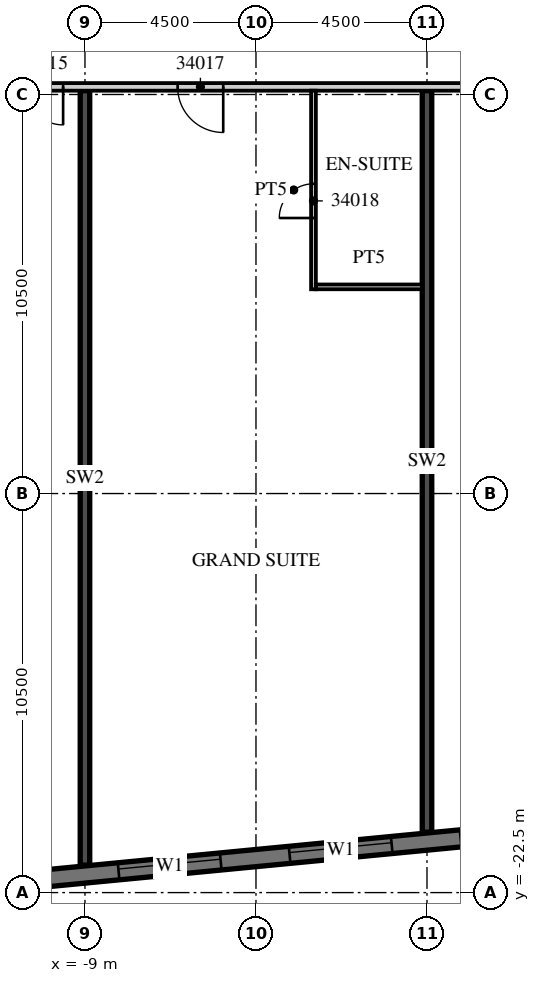
"""IFC4 building model, lengths in metres.
Left out: names, types, materials, properties, quantities, classifications, styles, units other than length and angle.
Written with IfcOpenShell. Run it as: python <this file> out.ifc"""

import sys

from ifc_helpers import new_model, si_unit, direction, frame, frame_2d, origin, place, context, subcontext, project, spatial, rectangle, extrude, element, fill, save


model = new_model("IFC4")
c1 = context("Model", 3, precision=1e-05, world=origin(), true_north=direction((0.0, 1.0)))
c2 = subcontext(c1, "Body", "Model", "MODEL_VIEW")
j1 = project(units=[si_unit("LENGTHUNIT", "METRE"), si_unit("PLANEANGLEUNIT", "RADIAN")], contexts=[c1])
p1 = place(None, origin())
s1 = spatial("IfcSite", under=j1, at=p1, CompositionType="ELEMENT")
p2 = place(p1, origin())
s2 = spatial("IfcBuilding", under=s1, at=p2, CompositionType="ELEMENT")
p3 = place(p2, frame((0.0, 0.0, 147.1)))
s3 = spatial("IfcBuildingStorey", under=s2, at=p3, CompositionType="ELEMENT", Elevation=147.1)
p4 = place(p3, frame((-9.0, -21.777, 0.0), z_axis=(0.0, 0.0, 1.0), x_axis=(0.0, 1.0, 0.0)))
e1 = element("IfcWall", 1, at=p4, inside=s3, PredefinedType="SHEAR", context=c2, shape_type="SweptSolid", body=[
    extrude(rectangle(XDim=20.377, YDim=0.25, at=frame_2d((10.188, 0.0))), origin(), (0.0, 0.0, 1.0), 3.0),
])
p5 = place(p3, frame((0.0, -20.91, 0.0), z_axis=(0.0, 0.0, 1.0), x_axis=(0.0, 1.0, 0.0)))
e2 = element("IfcWall", 2, at=p5, inside=s3, PredefinedType="SHEAR", context=c2, shape_type="SweptSolid", body=[
    extrude(rectangle(XDim=19.51, YDim=0.25, at=frame_2d((9.755, 0.0))), origin(), (0.0, 0.0, 1.0), 3.0),
])
p6 = place(p3, frame((-13.521, -22.46, 0.0), z_axis=(0.0, 0.0, 1.0), x_axis=(0.995396096335, 0.095846812164, 0.0)))
e3 = element("IfcWall", 3, at=p6, inside=s3, PredefinedType="SOLIDWALL", context=c2, shape_type="SweptSolid", body=[
    extrude(rectangle(XDim=59.151, YDim=0.45, at=frame_2d((29.575, 0.0))), origin(), (0.0, 0.0, 1.0), 3.0),
])
p7 = place(p6, frame((0.91, 0.0, 0.45)))
e4 = element("IfcOpeningElement", 4, at=p7, cuts=e3, PredefinedType="OPENING", context=c2, shape_type="SweptSolid", body=[
    extrude(rectangle(XDim=2.7, YDim=2.25, at=frame_2d((1.35, 1.125))), frame((0.0, 0.235, 0.0), z_axis=(0.0, -1.0, 0.0), x_axis=(1.0, 0.0, 0.0)), (0.0, 0.0, 1.0), 0.47),
])
p8 = place(p6, frame((5.431, 0.0, 0.45)))
e5 = element("IfcOpeningElement", 5, at=p8, cuts=e3, PredefinedType="OPENING", context=c2, shape_type="SweptSolid", body=[
    extrude(rectangle(XDim=2.7, YDim=2.25, at=frame_2d((1.35, 1.125))), frame((0.0, 0.235, 0.0), z_axis=(0.0, -1.0, 0.0), x_axis=(1.0, 0.0, 0.0)), (0.0, 0.0, 1.0), 0.47),
])
p9 = place(p6, frame((9.952, 0.0, 0.45)))
e6 = element("IfcOpeningElement", 6, at=p9, cuts=e3, PredefinedType="OPENING", context=c2, shape_type="SweptSolid", body=[
    extrude(rectangle(XDim=2.7, YDim=2.25, at=frame_2d((1.35, 1.125))), frame((0.0, 0.235, 0.0), z_axis=(0.0, -1.0, 0.0), x_axis=(1.0, 0.0, 0.0)), (0.0, 0.0, 1.0), 0.47),
])
p10 = place(p6, frame((14.473, 0.0, 0.45)))
e7 = element("IfcOpeningElement", 7, at=p10, cuts=e3, PredefinedType="OPENING", context=c2, shape_type="SweptSolid", body=[
    extrude(rectangle(XDim=2.7, YDim=2.25, at=frame_2d((1.35, 1.125))), frame((0.0, 0.235, 0.0), z_axis=(0.0, -1.0, 0.0), x_axis=(1.0, 0.0, 0.0)), (0.0, 0.0, 1.0), 0.47),
])
p11 = place(p6, frame((18.994, 0.0, 0.45)))
e8 = element("IfcOpeningElement", 8, at=p11, cuts=e3, PredefinedType="OPENING", context=c2, shape_type="SweptSolid", body=[
    extrude(rectangle(XDim=2.7, YDim=2.25, at=frame_2d((1.35, 1.125))), frame((0.0, 0.235, 0.0), z_axis=(0.0, -1.0, 0.0), x_axis=(1.0, 0.0, 0.0)), (0.0, 0.0, 1.0), 0.47),
])
p12 = place(p6, frame((23.514, 0.0, 0.45)))
e9 = element("IfcOpeningElement", 9, at=p12, cuts=e3, PredefinedType="OPENING", context=c2, shape_type="SweptSolid", body=[
    extrude(rectangle(XDim=2.7, YDim=2.25, at=frame_2d((1.35, 1.125))), frame((0.0, 0.235, 0.0), z_axis=(0.0, -1.0, 0.0), x_axis=(1.0, 0.0, 0.0)), (0.0, 0.0, 1.0), 0.47),
])
p13 = place(p6, frame((28.035, 0.0, 0.45)))
e10 = element("IfcOpeningElement", 10, at=p13, cuts=e3, PredefinedType="OPENING", context=c2, shape_type="SweptSolid", body=[
    extrude(rectangle(XDim=2.7, YDim=2.25, at=frame_2d((1.35, 1.125))), frame((0.0, 0.235, 0.0), z_axis=(0.0, -1.0, 0.0), x_axis=(1.0, 0.0, 0.0)), (0.0, 0.0, 1.0), 0.47),
])
p14 = place(p6, frame((32.556, 0.0, 0.45)))
e11 = element("IfcOpeningElement", 11, at=p14, cuts=e3, PredefinedType="OPENING", context=c2, shape_type="SweptSolid", body=[
    extrude(rectangle(XDim=2.7, YDim=2.25, at=frame_2d((1.35, 1.125))), frame((0.0, 0.235, 0.0), z_axis=(0.0, -1.0, 0.0), x_axis=(1.0, 0.0, 0.0)), (0.0, 0.0, 1.0), 0.47),
])
p15 = place(p6, frame((37.077, 0.0, 0.45)))
e12 = element("IfcOpeningElement", 12, at=p15, cuts=e3, PredefinedType="OPENING", context=c2, shape_type="SweptSolid", body=[
    extrude(rectangle(XDim=2.7, YDim=2.25, at=frame_2d((1.35, 1.125))), frame((0.0, 0.235, 0.0), z_axis=(0.0, -1.0, 0.0), x_axis=(1.0, 0.0, 0.0)), (0.0, 0.0, 1.0), 0.47),
])
p16 = place(p6, frame((41.598, 0.0, 0.45)))
e13 = element("IfcOpeningElement", 13, at=p16, cuts=e3, PredefinedType="OPENING", context=c2, shape_type="SweptSolid", body=[
    extrude(rectangle(XDim=2.7, YDim=2.25, at=frame_2d((1.35, 1.125))), frame((0.0, 0.235, 0.0), z_axis=(0.0, -1.0, 0.0), x_axis=(1.0, 0.0, 0.0)), (0.0, 0.0, 1.0), 0.47),
])
p17 = place(p6, frame((46.118, 0.0, 0.45)))
e14 = element("IfcOpeningElement", 14, at=p17, cuts=e3, PredefinedType="OPENING", context=c2, shape_type="SweptSolid", body=[
    extrude(rectangle(XDim=2.7, YDim=2.25, at=frame_2d((1.35, 1.125))), frame((0.0, 0.235, 0.0), z_axis=(0.0, -1.0, 0.0), x_axis=(1.0, 0.0, 0.0)), (0.0, 0.0, 1.0), 0.47),
])
p18 = place(p6, frame((50.639, 0.0, 0.45)))
e15 = element("IfcOpeningElement", 15, at=p18, cuts=e3, PredefinedType="OPENING", context=c2, shape_type="SweptSolid", body=[
    extrude(rectangle(XDim=2.7, YDim=2.25, at=frame_2d((1.35, 1.125))), frame((0.0, 0.235, 0.0), z_axis=(0.0, -1.0, 0.0), x_axis=(1.0, 0.0, 0.0)), (0.0, 0.0, 1.0), 0.47),
])
p19 = place(p6, frame((55.15, 0.0, 0.45)))
e16 = element("IfcOpeningElement", 16, at=p19, cuts=e3, PredefinedType="OPENING", context=c2, shape_type="SweptSolid", body=[
    extrude(rectangle(XDim=2.7, YDim=2.25, at=frame_2d((1.35, 1.125))), frame((0.0, 0.235, 0.0), z_axis=(0.0, -1.0, 0.0), x_axis=(1.0, 0.0, 0.0)), (0.0, 0.0, 1.0), 0.47),
])
p20 = place(p3, frame((-13.5, -1.3, 0.0), z_axis=(0.0, 0.0, 1.0), x_axis=(1.0, 0.0, 0.0)))
e17 = element("IfcWall", 17, at=p20, inside=s3, PredefinedType="PARTITIONING", context=c2, shape_type="SweptSolid", body=[
    extrude(rectangle(XDim=60.932, YDim=0.2, at=frame_2d((30.466, 0.0))), origin(), (0.0, 0.0, 1.0), 3.0),
])
p21 = place(p20, frame((2.925, 0.0, 0.0)))
e18 = element("IfcOpeningElement", 18, at=p21, cuts=e17, PredefinedType="OPENING", context=c2, shape_type="SweptSolid", body=[
    extrude(rectangle(XDim=1.0, YDim=2.1, at=frame_2d((0.5, 1.05))), frame((0.0, 0.11, 0.0), z_axis=(0.0, -1.0, 0.0), x_axis=(1.0, 0.0, 0.0)), (0.0, 0.0, 1.0), 0.22),
])
p22 = place(p20, frame((6.938, 0.0, 0.0)))
e19 = element("IfcOpeningElement", 19, at=p22, cuts=e17, PredefinedType="OPENING", context=c2, shape_type="SweptSolid", body=[
    extrude(rectangle(XDim=1.2, YDim=2.1, at=frame_2d((0.6, 1.05))), frame((0.0, 0.11, 0.0), z_axis=(0.0, -1.0, 0.0), x_axis=(1.0, 0.0, 0.0)), (0.0, 0.0, 1.0), 0.22),
])
p23 = place(p20, frame((15.938, 0.0, 0.0)))
e20 = element("IfcOpeningElement", 20, at=p23, cuts=e17, PredefinedType="OPENING", context=c2, shape_type="SweptSolid", body=[
    extrude(rectangle(XDim=1.2, YDim=2.1, at=frame_2d((0.6, 1.05))), frame((0.0, 0.11, 0.0), z_axis=(0.0, -1.0, 0.0), x_axis=(1.0, 0.0, 0.0)), (0.0, 0.0, 1.0), 0.22),
])
p24 = place(p20, frame((24.938, 0.0, 0.0)))
e21 = element("IfcOpeningElement", 21, at=p24, cuts=e17, PredefinedType="OPENING", context=c2, shape_type="SweptSolid", body=[
    extrude(rectangle(XDim=1.2, YDim=2.1, at=frame_2d((0.6, 1.05))), frame((0.0, 0.11, 0.0), z_axis=(0.0, -1.0, 0.0), x_axis=(1.0, 0.0, 0.0)), (0.0, 0.0, 1.0), 0.22),
])
p25 = place(p20, frame((32.075, 0.0, 0.0)))
e22 = element("IfcOpeningElement", 22, at=p25, cuts=e17, PredefinedType="OPENING", context=c2, shape_type="SweptSolid", body=[
    extrude(rectangle(XDim=1.0, YDim=2.1, at=frame_2d((0.5, 1.05))), frame((0.0, 0.11, 0.0), z_axis=(0.0, -1.0, 0.0), x_axis=(1.0, 0.0, 0.0)), (0.0, 0.0, 1.0), 0.22),
])
p26 = place(p20, frame((36.55, 0.0, 0.0)))
e23 = element("IfcOpeningElement", 23, at=p26, cuts=e17, PredefinedType="OPENING", context=c2, shape_type="SweptSolid", body=[
    extrude(rectangle(XDim=1.0, YDim=2.1, at=frame_2d((0.5, 1.05))), frame((0.0, 0.11, 0.0), z_axis=(0.0, -1.0, 0.0), x_axis=(1.0, 0.0, 0.0)), (0.0, 0.0, 1.0), 0.22),
])
p27 = place(p20, frame((42.938, 0.0, 0.0)))
e24 = element("IfcOpeningElement", 24, at=p27, cuts=e17, PredefinedType="OPENING", context=c2, shape_type="SweptSolid", body=[
    extrude(rectangle(XDim=1.2, YDim=2.1, at=frame_2d((0.6, 1.05))), frame((0.0, 0.11, 0.0), z_axis=(0.0, -1.0, 0.0), x_axis=(1.0, 0.0, 0.0)), (0.0, 0.0, 1.0), 0.22),
])
p28 = place(p20, frame((52.425, 0.0, 0.0)))
e25 = element("IfcOpeningElement", 25, at=p28, cuts=e17, PredefinedType="OPENING", context=c2, shape_type="SweptSolid", body=[
    extrude(rectangle(XDim=1.0, YDim=2.1, at=frame_2d((0.5, 1.05))), frame((0.0, 0.11, 0.0), z_axis=(0.0, -1.0, 0.0), x_axis=(1.0, 0.0, 0.0)), (0.0, 0.0, 1.0), 0.22),
])
p29 = place(p20, frame((58.316, 0.0, 0.0)))
e26 = element("IfcOpeningElement", 26, at=p29, cuts=e17, PredefinedType="OPENING", context=c2, shape_type="SweptSolid", body=[
    extrude(rectangle(XDim=1.2, YDim=2.1, at=frame_2d((0.6, 1.05))), frame((0.0, 0.11, 0.0), z_axis=(0.0, -1.0, 0.0), x_axis=(1.0, 0.0, 0.0)), (0.0, 0.0, 1.0), 0.22),
])
p30 = place(p3, frame((-2.987, -6.625, 0.0), z_axis=(0.0, 0.0, 1.0), x_axis=(0.0, 1.0, 0.0)))
e27 = element("IfcWall", 27, at=p30, inside=s3, PredefinedType="PARTITIONING", context=c2, shape_type="SweptSolid", body=[
    extrude(rectangle(XDim=5.225, YDim=0.125, at=frame_2d((2.613, 0.0))), origin(), (0.0, 0.0, 1.0), 3.0),
])
p31 = place(p30, frame((1.875, 0.0, 0.0)))
e28 = element("IfcOpeningElement", 28, at=p31, cuts=e27, PredefinedType="OPENING", context=c2, shape_type="SweptSolid", body=[
    extrude(rectangle(XDim=0.9, YDim=2.1, at=frame_2d((0.45, 1.05))), frame((0.0, 0.073, 0.0), z_axis=(0.0, -1.0, 0.0), x_axis=(1.0, 0.0, 0.0)), (0.0, 0.0, 1.0), 0.145),
])
p32 = place(p3, frame((-2.925, -6.562, 0.0), z_axis=(0.0, 0.0, 1.0), x_axis=(1.0, 0.0, 0.0)))
e29 = element("IfcWall", 29, at=p32, inside=s3, PredefinedType="PARTITIONING", context=c2, shape_type="SweptSolid", body=[
    extrude(rectangle(XDim=2.8, YDim=0.125, at=frame_2d((1.4, 0.0))), origin(), (0.0, 0.0, 1.0), 3.0),
])
p33 = place(p8, origin())
e30 = element("IfcWindow", 30, at=p33, inside=s3, PartitioningType="SINGLE_PANEL", PredefinedType="WINDOW", context=c2, shape_type="SweptSolid", body=[
    extrude(rectangle(XDim=2.7, YDim=2.25, at=frame_2d((1.35, 1.125))), frame((0.0, 0.09, 0.0), z_axis=(0.0, -1.0, 0.0), x_axis=(1.0, 0.0, 0.0)), (0.0, 0.0, 1.0), 0.06),
])
fill(e5, e30)
p34 = place(p9, origin())
e31 = element("IfcWindow", 31, at=p34, inside=s3, PartitioningType="SINGLE_PANEL", PredefinedType="WINDOW", context=c2, shape_type="SweptSolid", body=[
    extrude(rectangle(XDim=2.7, YDim=2.25, at=frame_2d((1.35, 1.125))), frame((0.0, 0.09, 0.0), z_axis=(0.0, -1.0, 0.0), x_axis=(1.0, 0.0, 0.0)), (0.0, 0.0, 1.0), 0.06),
])
fill(e6, e31)
p35 = place(p21, origin())
e32 = element("IfcDoor", 32, at=p35, inside=s3, OperationType="SINGLE_SWING_RIGHT", PredefinedType="DOOR", context=c2, shape_type="SweptSolid", body=[
    extrude(rectangle(XDim=1.0, YDim=2.1, at=frame_2d((0.5, 1.05))), frame((0.0, 0.025, 0.0), z_axis=(0.0, -1.0, 0.0), x_axis=(1.0, 0.0, 0.0)), (0.0, 0.0, 1.0), 0.05),
])
fill(e18, e32)
p36 = place(p22, origin())
e33 = element("IfcDoor", 33, at=p36, inside=s3, OperationType="SINGLE_SWING_RIGHT", PredefinedType="DOOR", context=c2, shape_type="SweptSolid", body=[
    extrude(rectangle(XDim=1.2, YDim=2.1, at=frame_2d((0.6, 1.05))), frame((0.0, 0.025, 0.0), z_axis=(0.0, -1.0, 0.0), x_axis=(1.0, 0.0, 0.0)), (0.0, 0.0, 1.0), 0.05),
])
fill(e19, e33)
p37 = place(p31, origin())
e34 = element("IfcDoor", 34, at=p37, inside=s3, OperationType="SINGLE_SWING_LEFT", PredefinedType="DOOR", context=c2, shape_type="SweptSolid", body=[
    extrude(rectangle(XDim=0.9, YDim=2.1, at=frame_2d((0.45, 1.05))), frame((0.0, 0.025, 0.0), z_axis=(0.0, -1.0, 0.0), x_axis=(1.0, 0.0, 0.0)), (0.0, 0.0, 1.0), 0.05),
])
fill(e28, e34)
save(model, sys.argv[1])
